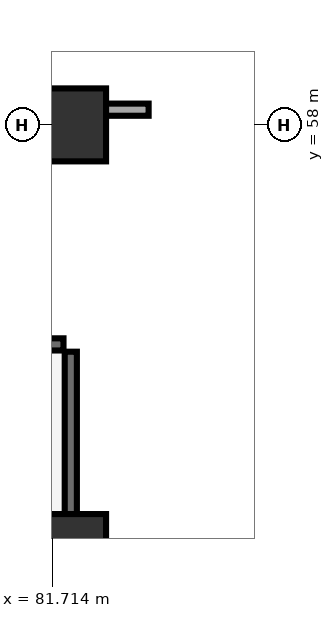
"""IFC4 building model, lengths in metres.
Left out: names, types, materials, properties, quantities, classifications, styles, units other than length and angle.
Written with IfcOpenShell. Run it as: python <this file> out.ifc"""

import sys

from ifc_helpers import new_model, si_unit, direction, frame, frame_2d, origin, origin_2d, place, context, subcontext, project, spatial, rectangle, extrude, element, save


model = new_model("IFC4")
c1 = context("Model", 3, precision=1e-05, world=origin(), true_north=direction((0.0, 1.0)))
c2 = subcontext(c1, "Body", "Model", "MODEL_VIEW")
j1 = project(units=[si_unit("LENGTHUNIT", "METRE"), si_unit("PLANEANGLEUNIT", "RADIAN")], contexts=[c1])
p1 = place(None, origin())
s1 = spatial("IfcSite", under=j1, at=p1, CompositionType="ELEMENT")
p2 = place(p1, origin())
s2 = spatial("IfcBuilding", under=s1, at=p2, CompositionType="ELEMENT")
p3 = place(p2, frame((0.0, 0.0, 211.95)))
s3 = spatial("IfcBuildingStorey", under=s2, at=p3, CompositionType="ELEMENT", Elevation=211.95)
for number, where, z_axis, x_axis in (
    (1, (82.0, 51.0, 0.0), (0.0, 0.0, 1.0), (1.0, 0.0, 0.0)),
    (2, (82.0, 58.0, 0.0), (0.0, 0.0, 1.0), (1.0, 0.0, 0.0)),
):
    element("IfcColumn", number, at=place(p3, frame(where, z_axis=z_axis, x_axis=x_axis)), inside=s3, PredefinedType="PILASTER", context=c2, shape_type="SweptSolid", body=[
        extrude(rectangle(XDim=1.2, YDim=1.2, at=origin_2d()), origin(), (0.0, 0.0, 1.0), 3.75),
    ])
p4 = place(p3, frame((82.02, 51.2, 0.0), z_axis=(0.0, 0.0, 1.0), x_axis=(0.0, 1.0, 0.0)))
e3 = element("IfcWall", 3, at=p4, inside=s3, PredefinedType="SHEAR", context=c2, shape_type="SweptSolid", body=[
    extrude(rectangle(XDim=3.07, YDim=0.2, at=frame_2d((1.535, 0.0))), origin(), (0.0, 0.0, 1.0), 3.49),
])
p5 = place(p3, frame((81.9, 54.39, 0.0), z_axis=(0.0, 0.0, 1.0), x_axis=(-1.0, 0.0, 0.0)))
e4 = element("IfcWall", 4, at=p5, inside=s3, PredefinedType="SHEAR", context=c2, shape_type="SweptSolid", body=[
    extrude(rectangle(XDim=8.46, YDim=0.2, at=frame_2d((4.23, 0.0))), origin(), (0.0, 0.0, 1.0), 3.49),
])
p6 = place(p3, frame((79.3, 58.25, 0.0), z_axis=(0.0, 0.0, 1.0), x_axis=(1.0, 0.0, 0.0)))
e5 = element("IfcWall", 5, at=p6, inside=s3, PredefinedType="SOLIDWALL", context=c2, shape_type="SweptSolid", body=[
    extrude(rectangle(XDim=4.0, YDim=0.2, at=frame_2d((2.0, 0.0))), origin(), (0.0, 0.0, 1.0), 2.775),
])
p7 = place(p6, frame((0.5, 0.0, 0.0)))
e6 = element("IfcOpeningElement", 6, at=p7, cuts=e5, PredefinedType="OPENING", context=c2, shape_type="SweptSolid", body=[
    extrude(rectangle(XDim=1.1, YDim=2.1, at=frame_2d((0.55, 1.05))), frame((0.0, 0.11, 0.0), z_axis=(0.0, -1.0, 0.0), x_axis=(1.0, 0.0, 0.0)), (0.0, 0.0, 1.0), 0.22),
])
p8 = place(p3, frame((82.588, 48.389, 0.0), z_axis=(0.0, 0.0, 1.0), x_axis=(0.68157475052, 0.731748494671, 0.0)))
e7 = element("IfcWall", 7, at=p8, inside=s3, PredefinedType="PARTITIONING", context=c2, shape_type="SweptSolid", body=[
    extrude(rectangle(XDim=5.08, YDim=0.1, at=frame_2d((2.54, 0.0))), origin(), (0.0, 0.0, 1.0), 3.025),
])
save(model, sys.argv[1])
